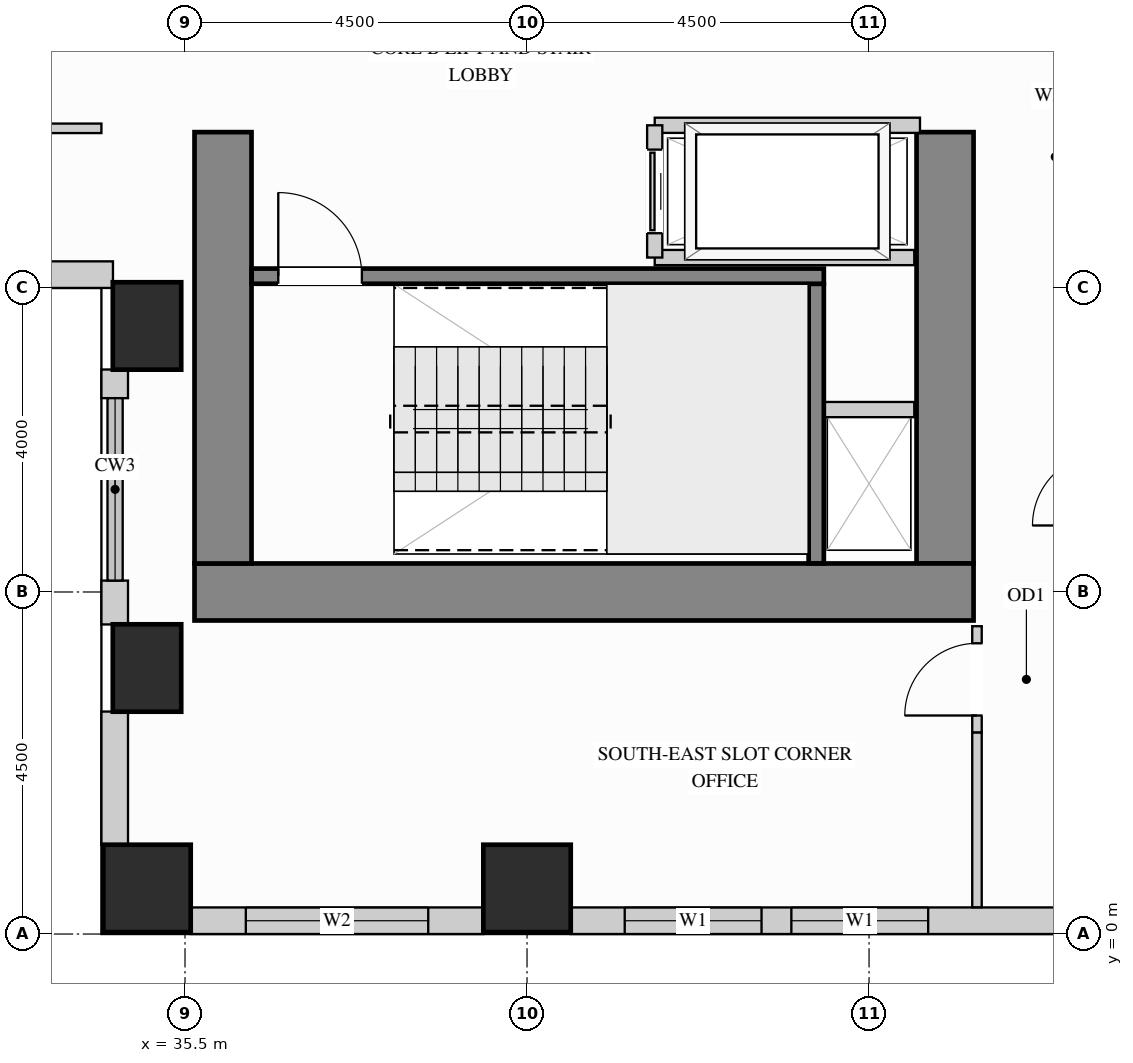
"""IFC4 building model, lengths in metres.
Left out: names, types, materials, properties, quantities, classifications, styles, units other than length and angle.
Written with IfcOpenShell. Run it as: python <this file> out.ifc"""

import sys

from ifc_helpers import new_model, si_unit, direction, frame, frame_2d, origin, origin_2d, place, context, subcontext, project, spatial, rectangle, extrude, source, transform, mapped, element, fill, save


model = new_model("IFC4")
c1 = context("Model", 3, precision=1e-05, world=origin(), true_north=direction((0.0, 1.0)))
c2 = subcontext(c1, "Body", "Model", "MODEL_VIEW")
j1 = project(units=[si_unit("LENGTHUNIT", "METRE"), si_unit("PLANEANGLEUNIT", "RADIAN")], contexts=[c1])
p1 = place(None, origin())
s1 = spatial("IfcSite", under=j1, at=p1, CompositionType="ELEMENT")
p2 = place(p1, origin())
s2 = spatial("IfcBuilding", under=s1, at=p2, CompositionType="ELEMENT")
p3 = place(p2, frame((0.0, 0.0, 131.4)))
s3 = spatial("IfcBuildingStorey", under=s2, at=p3, CompositionType="ELEMENT", Elevation=131.4)
m1 = source(origin(), c2, "Body", "SweptSolid", [
    extrude(rectangle(XDim=0.9, YDim=1.15, at=origin_2d()), origin(), (0.0, 0.0, 1.0), 3.38),
])
for number, where, z_axis, x_axis in (
    (1, (35.0, 3.5, 0.0), (0.0, 0.0, 1.0), (1.0, 0.0, 0.0)),
    (2, (35.0, 8.0, 0.0), (0.0, 0.0, 1.0), (1.0, 0.0, 0.0)),
):
    element("IfcColumn", number, at=place(p3, frame(where, z_axis=z_axis, x_axis=x_axis)), inside=s3, PredefinedType="COLUMN", context=c2, shape_type="MappedRepresentation", body=[
        mapped(m1, transform((0.0, 0.0, 0.0), x_axis=(1.0, 0.0, 0.0), y_axis=(0.0, 1.0, 0.0), z_axis=(0.0, 0.0, 1.0))),
    ])
m2 = source(origin(), c2, "Body", "SweptSolid", [
    extrude(rectangle(XDim=1.15, YDim=1.15, at=origin_2d()), origin(), (0.0, 0.0, 1.0), 3.38),
])
for number, where, z_axis, x_axis in (
    (3, (35.0, 0.6, 0.0), (0.0, 0.0, 1.0), (1.0, 0.0, 0.0)),
    (4, (40.0, 0.6, 0.0), (0.0, 0.0, 1.0), (1.0, 0.0, 0.0)),
):
    element("IfcColumn", number, at=place(p3, frame(where, z_axis=z_axis, x_axis=x_axis)), inside=s3, PredefinedType="COLUMN", context=c2, shape_type="MappedRepresentation", body=[
        mapped(m2, transform((0.0, 0.0, 0.0), x_axis=(1.0, 0.0, 0.0), y_axis=(0.0, 1.0, 0.0), z_axis=(0.0, 0.0, 1.0))),
    ])
m3 = source(origin(), c2, "Body", "SweptSolid", [
    extrude(rectangle(XDim=5.675, YDim=0.75, at=frame_2d((2.837, 0.0))), origin(), (0.0, 0.0, 1.0), 3.38),
])
p4 = place(p3, frame((45.5, 4.875, 0.0), z_axis=(0.0, 0.0, 1.0), x_axis=(0.0, 1.0, 0.0)))
e5 = element("IfcWall", 5, at=p4, inside=s3, PredefinedType="SHEAR", context=c2, shape_type="MappedRepresentation", body=[
    mapped(m3, transform((0.0, 0.0, 0.0), x_axis=(1.0, 0.0, 0.0), y_axis=(0.0, 1.0, 0.0), z_axis=(0.0, 0.0, 1.0))),
])
m4 = source(origin(), c2, "Body", "SweptSolid", [
    extrude(rectangle(XDim=10.25, YDim=0.75, at=frame_2d((5.125, 0.0))), origin(), (0.0, 0.0, 1.0), 3.38),
])
p5 = place(p3, frame((35.625, 4.5, 0.0), z_axis=(0.0, 0.0, 1.0), x_axis=(1.0, 0.0, 0.0)))
e6 = element("IfcWall", 6, at=p5, inside=s3, PredefinedType="SHEAR", context=c2, shape_type="MappedRepresentation", body=[
    mapped(m4, transform((0.0, 0.0, 0.0), x_axis=(1.0, 0.0, 0.0), y_axis=(0.0, 1.0, 0.0), z_axis=(0.0, 0.0, 1.0))),
])
p6 = place(p3, frame((36.0, 4.875, 0.0), z_axis=(0.0, 0.0, 1.0), x_axis=(0.0, 1.0, 0.0)))
e7 = element("IfcWall", 7, at=p6, inside=s3, PredefinedType="SHEAR", context=c2, shape_type="MappedRepresentation", body=[
    mapped(m3, transform((0.0, 0.0, 0.0), x_axis=(1.0, 0.0, 0.0), y_axis=(0.0, 1.0, 0.0), z_axis=(0.0, 0.0, 1.0))),
])
p7 = place(p3, frame((30.948, 8.675, 0.0), z_axis=(0.0, 0.0, 1.0), x_axis=(1.0, 0.0, 0.0)))
e8 = element("IfcWall", 8, at=p7, inside=s3, PredefinedType="SOLIDWALL", context=c2, shape_type="SweptSolid", body=[
    extrude(rectangle(XDim=3.604, YDim=0.35, at=frame_2d((1.802, 0.0))), origin(), (0.0, 0.0, 1.0), 3.365),
])
p8 = place(p7, frame((1.052, 0.0, 0.78)))
e9 = element("IfcOpeningElement", 9, at=p8, cuts=e8, PredefinedType="OPENING", context=c2, shape_type="SweptSolid", body=[
    extrude(rectangle(XDim=1.5, YDim=2.0, at=frame_2d((0.75, 1.0))), frame((0.0, 0.185, 0.0), z_axis=(0.0, -1.0, 0.0), x_axis=(1.0, 0.0, 0.0)), (0.0, 0.0, 1.0), 0.37),
])
m5 = source(origin(), c2, "Body", "SweptSolid", [
    extrude(rectangle(XDim=0.377, YDim=0.35, at=frame_2d((0.188, 0.0))), origin(), (0.0, 0.0, 1.0), 3.365),
])
p9 = place(p3, frame((34.575, 7.427, 0.0), z_axis=(0.0, 0.0, 1.0), x_axis=(0.0, -1.0, 0.0)))
e10 = element("IfcWall", 10, at=p9, inside=s3, PredefinedType="SOLIDWALL", context=c2, shape_type="MappedRepresentation", body=[
    mapped(m5, transform((0.0, 0.0, 0.0), x_axis=(1.0, 0.0, 0.0), y_axis=(0.0, 1.0, 0.0), z_axis=(0.0, 0.0, 1.0))),
])
m6 = source(origin(), c2, "Body", "SweptSolid", [
    extrude(rectangle(XDim=0.577, YDim=0.35, at=frame_2d((0.289, 0.0))), origin(), (0.0, 0.0, 1.0), 3.365),
])
p10 = place(p3, frame((34.575, 4.65, 0.0), z_axis=(0.0, 0.0, 1.0), x_axis=(0.0, -1.0, 0.0)))
e11 = element("IfcWall", 11, at=p10, inside=s3, PredefinedType="SOLIDWALL", context=c2, shape_type="MappedRepresentation", body=[
    mapped(m6, transform((0.0, 0.0, 0.0), x_axis=(1.0, 0.0, 0.0), y_axis=(0.0, 1.0, 0.0), z_axis=(0.0, 0.0, 1.0))),
])
m7 = source(origin(), c2, "Body", "SweptSolid", [
    extrude(rectangle(XDim=1.754, YDim=0.35, at=frame_2d((0.877, 0.0))), origin(), (0.0, 0.0, 1.0), 3.365),
])
p11 = place(p3, frame((34.575, 2.927, 0.0), z_axis=(0.0, 0.0, 1.0), x_axis=(0.0, -1.0, 0.0)))
e12 = element("IfcWall", 12, at=p11, inside=s3, PredefinedType="SOLIDWALL", context=c2, shape_type="MappedRepresentation", body=[
    mapped(m7, transform((0.0, 0.0, 0.0), x_axis=(1.0, 0.0, 0.0), y_axis=(0.0, 1.0, 0.0), z_axis=(0.0, 0.0, 1.0))),
])
p12 = place(p3, frame((35.573, 0.175, 0.0), z_axis=(0.0, 0.0, 1.0), x_axis=(1.0, 0.0, 0.0)))
e13 = element("IfcWall", 13, at=p12, inside=s3, PredefinedType="SOLIDWALL", context=c2, shape_type="SweptSolid", body=[
    extrude(rectangle(XDim=3.854, YDim=0.35, at=frame_2d((1.927, 0.0))), origin(), (0.0, 0.0, 1.0), 2.428),
])
p13 = place(p12, frame((0.727, 0.0, 0.78)))
e14 = element("IfcOpeningElement", 14, at=p13, cuts=e13, PredefinedType="OPENING", context=c2, shape_type="SweptSolid", body=[
    extrude(rectangle(XDim=2.4, YDim=1.468, at=frame_2d((1.2, 0.734))), frame((0.0, 0.185, 0.0), z_axis=(0.0, -1.0, 0.0), x_axis=(1.0, 0.0, 0.0)), (0.0, 0.0, 1.0), 0.37),
])
p14 = place(p3, frame((40.573, 0.175, 0.0), z_axis=(0.0, 0.0, 1.0), x_axis=(1.0, 0.0, 0.0)))
e15 = element("IfcWall", 15, at=p14, inside=s3, PredefinedType="SOLIDWALL", context=c2, shape_type="SweptSolid", body=[
    extrude(rectangle(XDim=6.454, YDim=0.35, at=frame_2d((3.227, 0.0))), origin(), (0.0, 0.0, 1.0), 2.428),
])
p15 = place(p14, frame((0.712, 0.0, 0.78)))
e16 = element("IfcOpeningElement", 16, at=p15, cuts=e15, PredefinedType="OPENING", context=c2, shape_type="SweptSolid", body=[
    extrude(rectangle(XDim=1.8, YDim=1.468, at=frame_2d((0.9, 0.734))), frame((0.0, 0.185, 0.0), z_axis=(0.0, -1.0, 0.0), x_axis=(1.0, 0.0, 0.0)), (0.0, 0.0, 1.0), 0.37),
])
p16 = place(p14, frame((2.905, 0.0, 0.78)))
e17 = element("IfcOpeningElement", 17, at=p16, cuts=e15, PredefinedType="OPENING", context=c2, shape_type="SweptSolid", body=[
    extrude(rectangle(XDim=1.8, YDim=1.468, at=frame_2d((0.9, 0.734))), frame((0.0, 0.185, 0.0), z_axis=(0.0, -1.0, 0.0), x_axis=(1.0, 0.0, 0.0)), (0.0, 0.0, 1.0), 0.37),
])
p17 = place(p3, frame((45.92, 2.65, 0.0), z_axis=(0.0, 0.0, 1.0), x_axis=(0.0, 1.0, 0.0)))
e18 = element("IfcWall", 18, at=p17, inside=s3, PredefinedType="PARTITIONING", context=c2, shape_type="SweptSolid", body=[
    extrude(rectangle(XDim=1.4, YDim=0.125, at=frame_2d((0.7, 0.0))), origin(), (0.0, 0.0, 1.0), 3.365),
])
p18 = place(p17, frame((0.225, 0.0, 0.0)))
e19 = element("IfcOpeningElement", 19, at=p18, cuts=e18, PredefinedType="OPENING", context=c2, shape_type="SweptSolid", body=[
    extrude(rectangle(XDim=0.95, YDim=2.15, at=frame_2d((0.475, 1.075))), frame((0.0, 0.073, 0.0), z_axis=(0.0, -1.0, 0.0), x_axis=(1.0, 0.0, 0.0)), (0.0, 0.0, 1.0), 0.145),
])
m8 = source(origin(), c2, "Body", "SweptSolid", [
    extrude(rectangle(XDim=2.298, YDim=0.125, at=frame_2d((1.149, 0.0))), origin(), (0.0, 0.0, 1.0), 3.365),
])
p19 = place(p3, frame((45.92, 0.352, 0.0), z_axis=(0.0, 0.0, 1.0), x_axis=(0.0, 1.0, 0.0)))
e20 = element("IfcWall", 20, at=p19, inside=s3, PredefinedType="PARTITIONING", context=c2, shape_type="MappedRepresentation", body=[
    mapped(m8, transform((0.0, 0.0, 0.0), x_axis=(1.0, 0.0, 0.0), y_axis=(0.0, 1.0, 0.0), z_axis=(0.0, 0.0, 1.0))),
])
p20 = place(p3, frame((19.5, 10.6, 0.0), z_axis=(0.0, 0.0, 1.0), x_axis=(1.0, 0.0, 0.0)))
e21 = element("IfcWall", 21, at=p20, inside=s3, PredefinedType="PARTITIONING", context=c2, shape_type="SweptSolid", body=[
    extrude(rectangle(XDim=14.9, YDim=0.125, at=frame_2d((7.45, 0.0))), origin(), (0.0, 0.0, 1.0), 3.365),
])
p21 = place(p20, frame((6.975, 0.0, 0.0)))
e22 = element("IfcOpeningElement", 22, at=p21, cuts=e21, PredefinedType="OPENING", context=c2, shape_type="SweptSolid", body=[
    extrude(rectangle(XDim=0.95, YDim=2.15, at=frame_2d((0.475, 1.075))), frame((0.0, 0.073, 0.0), z_axis=(0.0, -1.0, 0.0), x_axis=(1.0, 0.0, 0.0)), (0.0, 0.0, 1.0), 0.145),
])
m9 = source(origin(), c2, "Body", "SweptSolid", [
    extrude(rectangle(XDim=1.245, YDim=0.2, at=frame_2d((0.623, 0.0))), origin(), (0.0, 0.0, 1.0), 3.365),
])
p22 = place(p3, frame((43.85, 6.9, 0.0), z_axis=(0.0, 0.0, 1.0), x_axis=(1.0, 0.0, 0.0)))
e23 = element("IfcWall", 23, at=p22, inside=s3, PredefinedType="PARTITIONING", context=c2, shape_type="MappedRepresentation", body=[
    mapped(m9, transform((0.0, 0.0, 0.0), x_axis=(1.0, 0.0, 0.0), y_axis=(0.0, 1.0, 0.0), z_axis=(0.0, 0.0, 1.0))),
])
m10 = source(origin(), c2, "Body", "SweptSolid", [
    extrude(rectangle(XDim=3.49, YDim=0.2, at=frame_2d((1.745, 0.0))), origin(), (0.0, 0.0, 1.0), 3.365),
])
p23 = place(p3, frame((41.68, 10.64, 0.0), z_axis=(0.0, 0.0, 1.0), x_axis=(1.0, 0.0, 0.0)))
e24 = element("IfcWall", 24, at=p23, inside=s3, PredefinedType="PARTITIONING", context=c2, shape_type="MappedRepresentation", body=[
    mapped(m10, transform((0.0, 0.0, 0.0), x_axis=(1.0, 0.0, 0.0), y_axis=(0.0, 1.0, 0.0), z_axis=(0.0, 0.0, 1.0))),
])
m11 = source(origin(), c2, "Body", "SweptSolid", [
    extrude(rectangle(XDim=3.415, YDim=0.2, at=frame_2d((1.708, 0.0))), origin(), (0.0, 0.0, 1.0), 3.365),
])
p24 = place(p3, frame((41.68, 8.9, 0.0), z_axis=(0.0, 0.0, 1.0), x_axis=(1.0, 0.0, 0.0)))
e25 = element("IfcWall", 25, at=p24, inside=s3, PredefinedType="PARTITIONING", context=c2, shape_type="MappedRepresentation", body=[
    mapped(m11, transform((0.0, 0.0, 0.0), x_axis=(1.0, 0.0, 0.0), y_axis=(0.0, 1.0, 0.0), z_axis=(0.0, 0.0, 1.0))),
])
p25 = place(p3, frame((41.68, 8.9, 0.0), z_axis=(0.0, 0.0, 1.0), x_axis=(0.0, 1.0, 0.0)))
e26 = element("IfcWall", 26, at=p25, inside=s3, PredefinedType="PARTITIONING", context=c2, shape_type="SweptSolid", body=[
    extrude(rectangle(XDim=1.74, YDim=0.2, at=frame_2d((0.87, 0.0))), origin(), (0.0, 0.0, 1.0), 3.365),
])
p26 = place(p25, frame((0.32, 0.0, 0.0)))
e27 = element("IfcOpeningElement", 27, at=p26, cuts=e26, PredefinedType="OPENING", context=c2, shape_type="SweptSolid", body=[
    extrude(rectangle(XDim=1.1, YDim=2.2, at=frame_2d((0.55, 1.1))), frame((0.0, 0.11, 0.0), z_axis=(0.0, -1.0, 0.0), x_axis=(1.0, 0.0, 0.0)), (0.0, 0.0, 1.0), 0.22),
])
m12 = source(origin(), c2, "Body", "SweptSolid", [
    extrude(rectangle(XDim=3.678, YDim=0.2, at=frame_2d((1.839, 0.0))), origin(), (0.0, 0.0, 1.0), 3.38),
])
p27 = place(p3, frame((43.805, 4.877, 0.0), z_axis=(0.0, 0.0, 1.0), x_axis=(0.0, 1.0, 0.0)))
e28 = element("IfcWall", 28, at=p27, inside=s3, PredefinedType="SHEAR", context=c2, shape_type="MappedRepresentation", body=[
    mapped(m12, transform((0.0, 0.0, 0.0), x_axis=(1.0, 0.0, 0.0), y_axis=(0.0, 1.0, 0.0), z_axis=(0.0, 0.0, 1.0))),
])
p28 = place(p3, frame((36.377, 8.655, 0.0), z_axis=(0.0, 0.0, 1.0), x_axis=(1.0, 0.0, 0.0)))
e29 = element("IfcWall", 29, at=p28, inside=s3, PredefinedType="SHEAR", context=c2, shape_type="SweptSolid", body=[
    extrude(rectangle(XDim=7.528, YDim=0.2, at=frame_2d((3.764, 0.0))), origin(), (0.0, 0.0, 1.0), 3.38),
])
p29 = place(p28, frame((0.35, 0.0, 0.0)))
e30 = element("IfcOpeningElement", 30, at=p29, cuts=e29, PredefinedType="OPENING", context=c2, shape_type="SweptSolid", body=[
    extrude(rectangle(XDim=1.1, YDim=2.15, at=frame_2d((0.55, 1.075))), frame((0.0, 0.11, 0.0), z_axis=(0.0, -1.0, 0.0), x_axis=(1.0, 0.0, 0.0)), (0.0, 0.0, 1.0), 0.22),
])
m13 = source(origin(), c2, "Body", "SweptSolid", [
    extrude(rectangle(XDim=1.1, YDim=2.2, at=frame_2d((0.55, 1.1))), frame((0.0, 0.025, 0.0), z_axis=(0.0, -1.0, 0.0), x_axis=(1.0, 0.0, 0.0)), (0.0, 0.0, 1.0), 0.05),
])
p30 = place(p26, origin())
e31 = element("IfcDoor", 31, at=p30, inside=s3, OperationType="SLIDING_TO_LEFT", PredefinedType="DOOR", context=c2, shape_type="MappedRepresentation", body=[
    mapped(m13, transform((0.0, 0.0, 0.0), x_axis=(1.0, 0.0, 0.0), y_axis=(0.0, 1.0, 0.0), z_axis=(0.0, 0.0, 1.0))),
])
fill(e27, e31)
m14 = source(origin(), c2, "Body", "SweptSolid", [
    extrude(rectangle(XDim=0.95, YDim=2.15, at=frame_2d((0.475, 1.075))), frame((0.0, 0.025, 0.0), z_axis=(0.0, -1.0, 0.0), x_axis=(1.0, 0.0, 0.0)), (0.0, 0.0, 1.0), 0.05),
])
p31 = place(p18, origin())
e32 = element("IfcDoor", 32, at=p31, inside=s3, OperationType="SINGLE_SWING_LEFT", PredefinedType="DOOR", context=c2, shape_type="MappedRepresentation", body=[
    mapped(m14, transform((0.0, 0.0, 0.0), x_axis=(1.0, 0.0, 0.0), y_axis=(0.0, 1.0, 0.0), z_axis=(0.0, 0.0, 1.0))),
])
fill(e19, e32)
m15 = source(origin(), c2, "Body", "SweptSolid", [
    extrude(rectangle(XDim=1.1, YDim=2.15, at=frame_2d((0.55, 1.075))), frame((0.0, 0.025, 0.0), z_axis=(0.0, -1.0, 0.0), x_axis=(1.0, 0.0, 0.0)), (0.0, 0.0, 1.0), 0.05),
])
p32 = place(p29, origin())
e33 = element("IfcDoor", 33, at=p32, inside=s3, OperationType="SINGLE_SWING_LEFT", PredefinedType="DOOR", context=c2, shape_type="MappedRepresentation", body=[
    mapped(m15, transform((0.0, 0.0, 0.0), x_axis=(1.0, 0.0, 0.0), y_axis=(0.0, 1.0, 0.0), z_axis=(0.0, 0.0, 1.0))),
])
fill(e30, e33)
m16 = source(origin(), c2, "Body", "SweptSolid", [
    extrude(rectangle(XDim=1.8, YDim=1.468, at=frame_2d((0.9, 0.734))), frame((0.0, 0.03, 0.0), z_axis=(0.0, -1.0, 0.0), x_axis=(1.0, 0.0, 0.0)), (0.0, 0.0, 1.0), 0.06),
])
p33 = place(p15, origin())
e34 = element("IfcWindow", 34, at=p33, inside=s3, PartitioningType="SINGLE_PANEL", PredefinedType="WINDOW", context=c2, shape_type="MappedRepresentation", body=[
    mapped(m16, transform((0.0, 0.0, 0.0), x_axis=(1.0, 0.0, 0.0), y_axis=(0.0, 1.0, 0.0), z_axis=(0.0, 0.0, 1.0))),
])
fill(e16, e34)
p34 = place(p16, origin())
e35 = element("IfcWindow", 35, at=p34, inside=s3, PartitioningType="SINGLE_PANEL", PredefinedType="WINDOW", context=c2, shape_type="MappedRepresentation", body=[
    mapped(m16, transform((0.0, 0.0, 0.0), x_axis=(1.0, 0.0, 0.0), y_axis=(0.0, 1.0, 0.0), z_axis=(0.0, 0.0, 1.0))),
])
fill(e17, e35)
m17 = source(origin(), c2, "Body", "SweptSolid", [
    extrude(rectangle(XDim=2.4, YDim=1.468, at=frame_2d((1.2, 0.734))), frame((0.0, 0.03, 0.0), z_axis=(0.0, -1.0, 0.0), x_axis=(1.0, 0.0, 0.0)), (0.0, 0.0, 1.0), 0.06),
])
p35 = place(p13, origin())
e36 = element("IfcWindow", 36, at=p35, inside=s3, PartitioningType="SINGLE_PANEL", PredefinedType="WINDOW", context=c2, shape_type="MappedRepresentation", body=[
    mapped(m17, transform((0.0, 0.0, 0.0), x_axis=(1.0, 0.0, 0.0), y_axis=(0.0, 1.0, 0.0), z_axis=(0.0, 0.0, 1.0))),
])
fill(e14, e36)
save(model, sys.argv[1])
